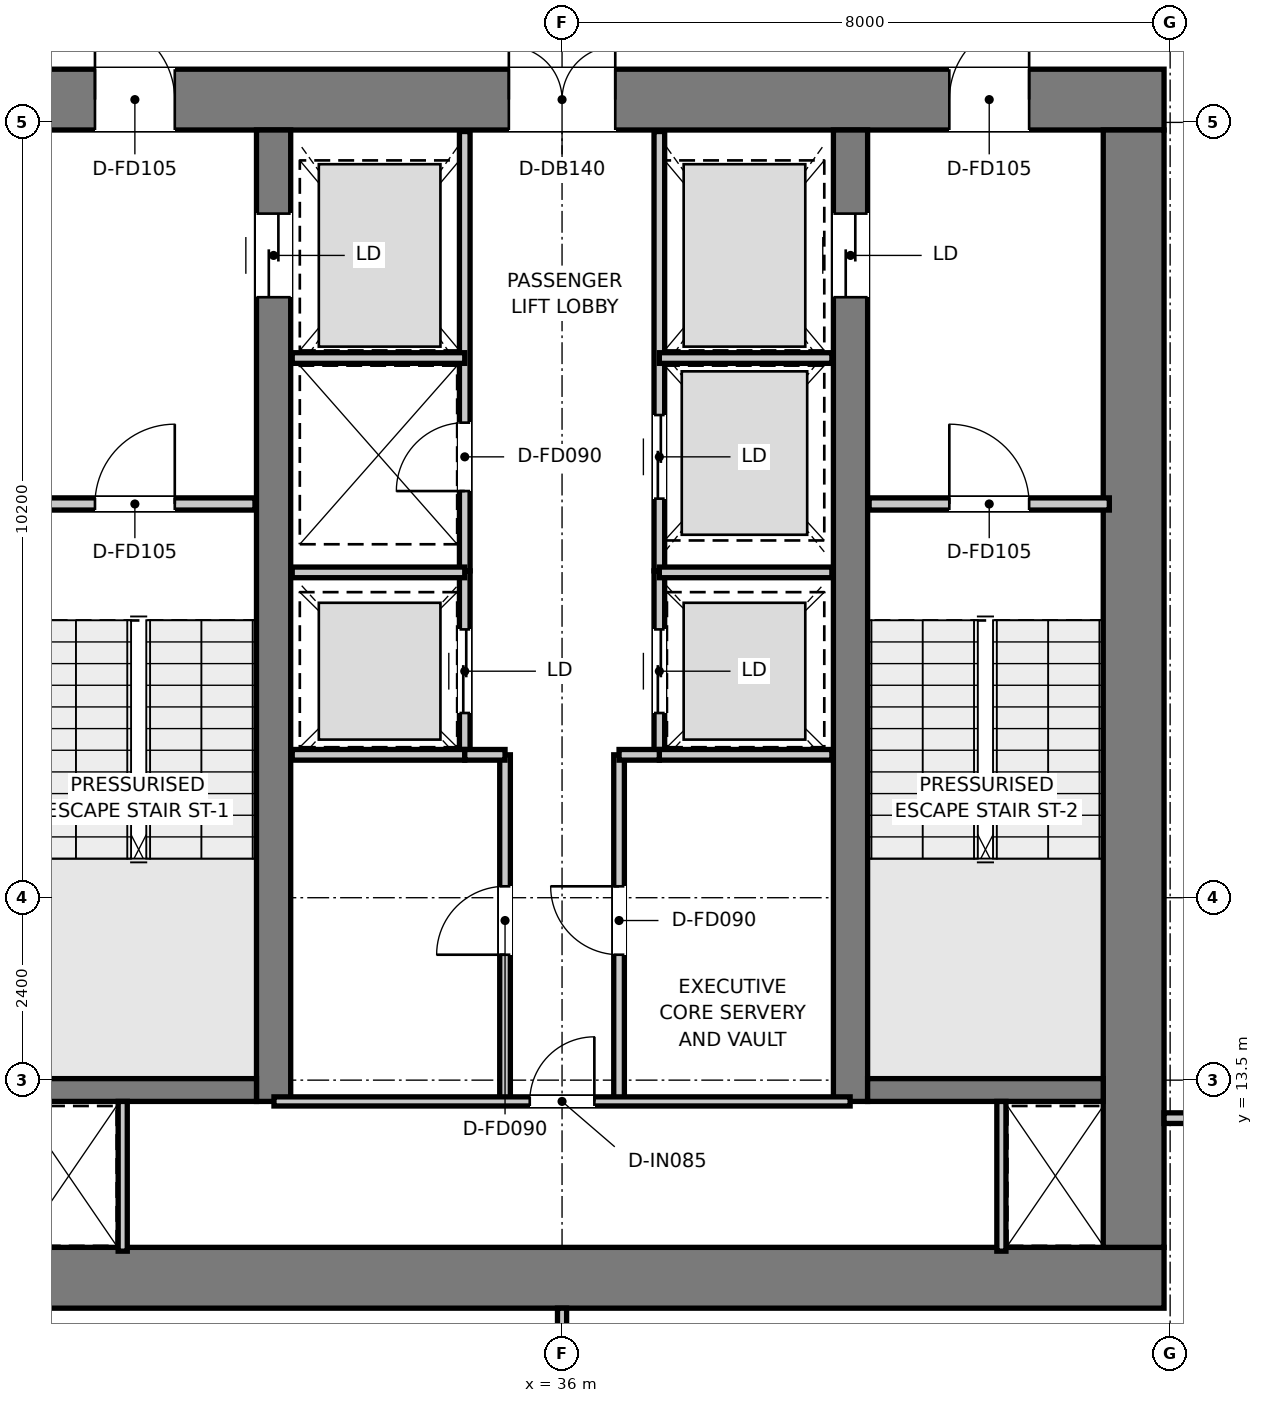
"""IFC4 building model, lengths in metres.
Left out: names, types, materials, properties, quantities, classifications, styles, units other than length and angle.
Written with IfcOpenShell. Run it as: python <this file> out.ifc"""

import sys

from ifc_helpers import new_model, si_unit, direction, frame, frame_2d, origin, place, context, subcontext, project, spatial, rectangle, extrude, element, fill, save


model = new_model("IFC4")
c1 = context("Model", 3, precision=1e-05, world=origin(), true_north=direction((0.0, 1.0)))
c2 = subcontext(c1, "Body", "Model", "MODEL_VIEW")
j1 = project(units=[si_unit("LENGTHUNIT", "METRE"), si_unit("PLANEANGLEUNIT", "RADIAN")], contexts=[c1])
p1 = place(None, origin())
s1 = spatial("IfcSite", under=j1, at=p1, CompositionType="ELEMENT")
p2 = place(p1, origin())
s2 = spatial("IfcBuilding", under=s1, at=p2, CompositionType="ELEMENT")
p3 = place(p2, frame((0.0, 0.0, 339.55)))
s3 = spatial("IfcBuildingStorey", under=s2, at=p3, CompositionType="ELEMENT", Elevation=339.55)
p4 = place(p3, frame((28.08, 10.9, 0.0), z_axis=(0.0, 0.0, 1.0), x_axis=(1.0, 0.0, 0.0)))
e1 = element("IfcWall", 1, at=p4, inside=s3, PredefinedType="SHEAR", context=c2, shape_type="SweptSolid", body=[
    extrude(rectangle(XDim=15.84, YDim=0.8, at=frame_2d((7.92, 0.0))), origin(), (0.0, 0.0, 1.0), 3.95),
])
p5 = place(p3, frame((28.08, 26.4, 0.0), z_axis=(0.0, 0.0, 1.0), x_axis=(1.0, 0.0, 0.0)))
e2 = element("IfcWall", 2, at=p5, inside=s3, PredefinedType="SHEAR", context=c2, shape_type="SweptSolid", body=[
    extrude(rectangle(XDim=15.84, YDim=0.8, at=frame_2d((7.92, 0.0))), origin(), (0.0, 0.0, 1.0), 3.95),
])
p6 = place(p5, frame((7.22, 0.0, 0.0)))
e3 = element("IfcOpeningElement", 3, at=p6, cuts=e2, PredefinedType="OPENING", context=c2, shape_type="SweptSolid", body=[
    extrude(rectangle(XDim=1.4, YDim=2.2, at=frame_2d((0.7, 1.1))), frame((0.0, 0.41, 0.0), z_axis=(0.0, -1.0, 0.0), x_axis=(1.0, 0.0, 0.0)), (0.0, 0.0, 1.0), 0.82),
])
p7 = place(p5, frame((1.775, 0.0, 0.0)))
e4 = element("IfcOpeningElement", 4, at=p7, cuts=e2, PredefinedType="OPENING", context=c2, shape_type="SweptSolid", body=[
    extrude(rectangle(XDim=1.05, YDim=2.1, at=frame_2d((0.525, 1.05))), frame((0.0, 0.41, 0.0), z_axis=(0.0, -1.0, 0.0), x_axis=(1.0, 0.0, 0.0)), (0.0, 0.0, 1.0), 0.82),
])
p8 = place(p5, frame((13.015, 0.0, 0.0)))
e5 = element("IfcOpeningElement", 5, at=p8, cuts=e2, PredefinedType="OPENING", context=c2, shape_type="SweptSolid", body=[
    extrude(rectangle(XDim=1.05, YDim=2.1, at=frame_2d((0.525, 1.05))), frame((0.0, 0.41, 0.0), z_axis=(0.0, -1.0, 0.0), x_axis=(1.0, 0.0, 0.0)), (0.0, 0.0, 1.0), 0.82),
])
p9 = place(p3, frame((43.52, 11.3, 0.0), z_axis=(0.0, 0.0, 1.0), x_axis=(0.0, 1.0, 0.0)))
e6 = element("IfcWall", 6, at=p9, inside=s3, PredefinedType="SHEAR", context=c2, shape_type="SweptSolid", body=[
    extrude(rectangle(XDim=14.7, YDim=0.8, at=frame_2d((7.35, 0.0))), origin(), (0.0, 0.0, 1.0), 3.95),
])
p10 = place(p3, frame((32.205, 13.22, 0.0), z_axis=(0.0, 0.0, 1.0), x_axis=(0.0, 1.0, 0.0)))
e7 = element("IfcWall", 7, at=p10, inside=s3, PredefinedType="SHEAR", context=c2, shape_type="SweptSolid", body=[
    extrude(rectangle(XDim=12.78, YDim=0.45, at=frame_2d((6.39, 0.0))), origin(), (0.0, 0.0, 1.0), 3.95),
])
p11 = place(p10, frame((10.58, 0.0, 0.0)))
e8 = element("IfcOpeningElement", 8, at=p11, cuts=e7, PredefinedType="OPENING", context=c2, shape_type="SweptSolid", body=[
    extrude(rectangle(XDim=1.1, YDim=2.15, at=frame_2d((0.55, 1.075))), frame((0.0, 0.235, 0.0), z_axis=(0.0, -1.0, 0.0), x_axis=(1.0, 0.0, 0.0)), (0.0, 0.0, 1.0), 0.47),
])
p12 = place(p3, frame((39.795, 13.22, 0.0), z_axis=(0.0, 0.0, 1.0), x_axis=(0.0, 1.0, 0.0)))
e9 = element("IfcWall", 9, at=p12, inside=s3, PredefinedType="SHEAR", context=c2, shape_type="SweptSolid", body=[
    extrude(rectangle(XDim=12.78, YDim=0.45, at=frame_2d((6.39, 0.0))), origin(), (0.0, 0.0, 1.0), 3.95),
])
p13 = place(p12, frame((10.58, 0.0, 0.0)))
e10 = element("IfcOpeningElement", 10, at=p13, cuts=e9, PredefinedType="OPENING", context=c2, shape_type="SweptSolid", body=[
    extrude(rectangle(XDim=1.1, YDim=2.15, at=frame_2d((0.55, 1.075))), frame((0.0, 0.235, 0.0), z_axis=(0.0, -1.0, 0.0), x_axis=(1.0, 0.0, 0.0)), (0.0, 0.0, 1.0), 0.47),
])
for number, where, z_axis, x_axis in (
    (11, (28.88, 13.37, 0.0), (0.0, 0.0, 1.0), (1.0, 0.0, 0.0)),
    (12, (40.02, 13.37, 0.0), (0.0, 0.0, 1.0), (1.0, 0.0, 0.0)),
):
    element("IfcWall", number, at=place(p3, frame(where, z_axis=z_axis, x_axis=x_axis)), inside=s3, PredefinedType="SHEAR", context=c2, shape_type="SweptSolid", body=[
        extrude(rectangle(XDim=3.1, YDim=0.3, at=frame_2d((1.55, 0.0))), origin(), (0.0, 0.0, 1.0), 3.95),
    ])
p14 = place(p3, frame((28.8, 21.08, 0.0), z_axis=(0.0, 0.0, 1.0), x_axis=(1.0, 0.0, 0.0)))
e13 = element("IfcWall", 13, at=p14, inside=s3, PredefinedType="PARTITIONING", context=c2, shape_type="SweptSolid", body=[
    extrude(rectangle(XDim=3.16, YDim=0.16, at=frame_2d((1.58, 0.0))), origin(), (0.0, 0.0, 1.0), 3.67),
])
p15 = place(p14, frame((1.055, 0.0, 0.0)))
e14 = element("IfcOpeningElement", 14, at=p15, cuts=e13, PredefinedType="OPENING", context=c2, shape_type="SweptSolid", body=[
    extrude(rectangle(XDim=1.05, YDim=2.1, at=frame_2d((0.525, 1.05))), frame((0.0, 0.09, 0.0), z_axis=(0.0, -1.0, 0.0), x_axis=(1.0, 0.0, 0.0)), (0.0, 0.0, 1.0), 0.18),
])
p16 = place(p3, frame((40.04, 21.08, 0.0), z_axis=(0.0, 0.0, 1.0), x_axis=(1.0, 0.0, 0.0)))
e15 = element("IfcWall", 15, at=p16, inside=s3, PredefinedType="PARTITIONING", context=c2, shape_type="SweptSolid", body=[
    extrude(rectangle(XDim=3.16, YDim=0.16, at=frame_2d((1.58, 0.0))), origin(), (0.0, 0.0, 1.0), 3.67),
])
p17 = place(p16, frame((1.055, 0.0, 0.0)))
e16 = element("IfcOpeningElement", 16, at=p17, cuts=e15, PredefinedType="OPENING", context=c2, shape_type="SweptSolid", body=[
    extrude(rectangle(XDim=1.05, YDim=2.1, at=frame_2d((0.525, 1.05))), frame((0.0, 0.09, 0.0), z_axis=(0.0, -1.0, 0.0), x_axis=(1.0, 0.0, 0.0)), (0.0, 0.0, 1.0), 0.18),
])
p18 = place(p3, frame((34.72, 20.2, 0.0), z_axis=(0.0, 0.0, 1.0), x_axis=(0.0, 1.0, 0.0)))
e17 = element("IfcWall", 17, at=p18, inside=s3, PredefinedType="PARTITIONING", context=c2, shape_type="SweptSolid", body=[
    extrude(rectangle(XDim=5.78, YDim=0.14, at=frame_2d((2.89, 0.0))), origin(), (0.0, 0.0, 1.0), 2.82),
])
p19 = place(p18, frame((1.05, 0.0, 0.0)))
e18 = element("IfcOpeningElement", 18, at=p19, cuts=e17, PredefinedType="OPENING", context=c2, shape_type="SweptSolid", body=[
    extrude(rectangle(XDim=0.9, YDim=2.1, at=frame_2d((0.45, 1.05))), frame((0.0, 0.08, 0.0), z_axis=(0.0, -1.0, 0.0), x_axis=(1.0, 0.0, 0.0)), (0.0, 0.0, 1.0), 0.16),
])
p20 = place(p3, frame((37.28, 20.2, 0.0), z_axis=(0.0, 0.0, 1.0), x_axis=(0.0, 1.0, 0.0)))
e19 = element("IfcWall", 19, at=p20, inside=s3, PredefinedType="PARTITIONING", context=c2, shape_type="SweptSolid", body=[
    extrude(rectangle(XDim=5.78, YDim=0.14, at=frame_2d((2.89, 0.0))), origin(), (0.0, 0.0, 1.0), 2.82),
])
p21 = place(p20, frame((0.95, 0.0, 0.0)))
e20 = element("IfcOpeningElement", 20, at=p21, cuts=e19, PredefinedType="OPENING", context=c2, shape_type="SweptSolid", body=[
    extrude(rectangle(XDim=1.1, YDim=2.15, at=frame_2d((0.55, 1.075))), frame((0.0, 0.08, 0.0), z_axis=(0.0, -1.0, 0.0), x_axis=(1.0, 0.0, 0.0)), (0.0, 0.0, 1.0), 0.16),
])
for number, where, z_axis, x_axis in (
    (21, (32.45, 23.0, 0.0), (0.0, 0.0, 1.0), (1.0, 0.0, 0.0)),
    (22, (37.28, 23.0, 0.0), (0.0, 0.0, 1.0), (1.0, 0.0, 0.0)),
):
    element("IfcWall", number, at=place(p3, frame(where, z_axis=z_axis, x_axis=x_axis)), inside=s3, PredefinedType="PARTITIONING", context=c2, shape_type="SweptSolid", body=[
        extrude(rectangle(XDim=2.27, YDim=0.14, at=frame_2d((1.135, 0.0))), origin(), (0.0, 0.0, 1.0), 2.82),
    ])
p22 = place(p3, frame((34.72, 17.78, 0.0), z_axis=(0.0, 0.0, 1.0), x_axis=(0.0, 1.0, 0.0)))
e23 = element("IfcWall", 23, at=p22, inside=s3, PredefinedType="PARTITIONING", context=c2, shape_type="SweptSolid", body=[
    extrude(rectangle(XDim=2.42, YDim=0.14, at=frame_2d((1.21, 0.0))), origin(), (0.0, 0.0, 1.0), 3.67),
])
p23 = place(p22, frame((0.55, 0.0, 0.0)))
e24 = element("IfcOpeningElement", 24, at=p23, cuts=e23, PredefinedType="OPENING", context=c2, shape_type="SweptSolid", body=[
    extrude(rectangle(XDim=1.1, YDim=2.15, at=frame_2d((0.55, 1.075))), frame((0.0, 0.08, 0.0), z_axis=(0.0, -1.0, 0.0), x_axis=(1.0, 0.0, 0.0)), (0.0, 0.0, 1.0), 0.16),
])
p24 = place(p3, frame((37.28, 17.78, 0.0), z_axis=(0.0, 0.0, 1.0), x_axis=(0.0, 1.0, 0.0)))
e25 = element("IfcWall", 25, at=p24, inside=s3, PredefinedType="PARTITIONING", context=c2, shape_type="SweptSolid", body=[
    extrude(rectangle(XDim=2.42, YDim=0.14, at=frame_2d((1.21, 0.0))), origin(), (0.0, 0.0, 1.0), 3.67),
])
p25 = place(p24, frame((0.55, 0.0, 0.0)))
e26 = element("IfcOpeningElement", 26, at=p25, cuts=e25, PredefinedType="OPENING", context=c2, shape_type="SweptSolid", body=[
    extrude(rectangle(XDim=1.1, YDim=2.15, at=frame_2d((0.55, 1.075))), frame((0.0, 0.08, 0.0), z_axis=(0.0, -1.0, 0.0), x_axis=(1.0, 0.0, 0.0)), (0.0, 0.0, 1.0), 0.16),
])
for number, where, z_axis, x_axis in (
    (27, (32.45, 17.78, 0.0), (0.0, 0.0, 1.0), (1.0, 0.0, 0.0)),
    (28, (32.45, 20.18, 0.0), (0.0, 0.0, 1.0), (1.0, 0.0, 0.0)),
    (29, (37.28, 17.78, 0.0), (0.0, 0.0, 1.0), (1.0, 0.0, 0.0)),
    (30, (37.28, 20.18, 0.0), (0.0, 0.0, 1.0), (1.0, 0.0, 0.0)),
):
    element("IfcWall", number, at=place(p3, frame(where, z_axis=z_axis, x_axis=x_axis)), inside=s3, PredefinedType="PARTITIONING", context=c2, shape_type="SweptSolid", body=[
        extrude(rectangle(XDim=2.27, YDim=0.14, at=frame_2d((1.135, 0.0))), origin(), (0.0, 0.0, 1.0), 3.67),
    ])
p26 = place(p3, frame((35.25, 13.22, 0.0), z_axis=(0.0, 0.0, 1.0), x_axis=(0.0, 1.0, 0.0)))
e31 = element("IfcWall", 31, at=p26, inside=s3, PredefinedType="PARTITIONING", context=c2, shape_type="SweptSolid", body=[
    extrude(rectangle(XDim=4.56, YDim=0.14, at=frame_2d((2.28, 0.0))), origin(), (0.0, 0.0, 1.0), 3.67),
])
p27 = place(p26, frame((1.93, 0.0, 0.0)))
e32 = element("IfcOpeningElement", 32, at=p27, cuts=e31, PredefinedType="OPENING", context=c2, shape_type="SweptSolid", body=[
    extrude(rectangle(XDim=0.9, YDim=2.1, at=frame_2d((0.45, 1.05))), frame((0.0, 0.08, 0.0), z_axis=(0.0, -1.0, 0.0), x_axis=(1.0, 0.0, 0.0)), (0.0, 0.0, 1.0), 0.16),
])
p28 = place(p3, frame((34.72, 17.78, 0.0), z_axis=(0.0, 0.0, 1.0), x_axis=(1.0, 0.0, 0.0)))
e33 = element("IfcWall", 33, at=p28, inside=s3, PredefinedType="PARTITIONING", context=c2, shape_type="SweptSolid", body=[
    extrude(rectangle(XDim=0.53, YDim=0.14, at=frame_2d((0.265, 0.0))), origin(), (0.0, 0.0, 1.0), 3.67),
])
p29 = place(p3, frame((36.75, 13.22, 0.0), z_axis=(0.0, 0.0, 1.0), x_axis=(0.0, 1.0, 0.0)))
e34 = element("IfcWall", 34, at=p29, inside=s3, PredefinedType="PARTITIONING", context=c2, shape_type="SweptSolid", body=[
    extrude(rectangle(XDim=4.56, YDim=0.14, at=frame_2d((2.28, 0.0))), origin(), (0.0, 0.0, 1.0), 3.67),
])
p30 = place(p29, frame((1.93, 0.0, 0.0)))
e35 = element("IfcOpeningElement", 35, at=p30, cuts=e34, PredefinedType="OPENING", context=c2, shape_type="SweptSolid", body=[
    extrude(rectangle(XDim=0.9, YDim=2.1, at=frame_2d((0.45, 1.05))), frame((0.0, 0.08, 0.0), z_axis=(0.0, -1.0, 0.0), x_axis=(1.0, 0.0, 0.0)), (0.0, 0.0, 1.0), 0.16),
])
p31 = place(p3, frame((36.75, 17.78, 0.0), z_axis=(0.0, 0.0, 1.0), x_axis=(1.0, 0.0, 0.0)))
e36 = element("IfcWall", 36, at=p31, inside=s3, PredefinedType="PARTITIONING", context=c2, shape_type="SweptSolid", body=[
    extrude(rectangle(XDim=0.53, YDim=0.14, at=frame_2d((0.265, 0.0))), origin(), (0.0, 0.0, 1.0), 3.67),
])
for number, where, z_axis, x_axis in (
    (37, (30.22, 11.25, 0.0), (0.0, 0.0, 1.0), (0.0, 1.0, 0.0)),
    (38, (41.78, 11.25, 0.0), (0.0, 0.0, 1.0), (0.0, 1.0, 0.0)),
):
    element("IfcWall", number, at=place(p3, frame(where, z_axis=z_axis, x_axis=x_axis)), inside=s3, PredefinedType="PARTITIONING", context=c2, shape_type="SweptSolid", body=[
        extrude(rectangle(XDim=1.97, YDim=0.12, at=frame_2d((0.985, 0.0))), origin(), (0.0, 0.0, 1.0), 3.67),
    ])
p32 = place(p3, frame((32.21, 13.22, 0.0), z_axis=(0.0, 0.0, 1.0), x_axis=(1.0, 0.0, 0.0)))
e39 = element("IfcWall", 39, at=p32, inside=s3, PredefinedType="PARTITIONING", context=c2, shape_type="SweptSolid", body=[
    extrude(rectangle(XDim=7.58, YDim=0.12, at=frame_2d((3.79, 0.0))), origin(), (0.0, 0.0, 1.0), 3.67),
])
p33 = place(p32, frame((3.365, 0.0, 0.0)))
e40 = element("IfcOpeningElement", 40, at=p33, cuts=e39, PredefinedType="OPENING", context=c2, shape_type="SweptSolid", body=[
    extrude(rectangle(XDim=0.85, YDim=2.1, at=frame_2d((0.425, 1.05))), frame((0.0, 0.07, 0.0), z_axis=(0.0, -1.0, 0.0), x_axis=(1.0, 0.0, 0.0)), (0.0, 0.0, 1.0), 0.14),
])
p34 = place(p3, frame((43.92, 13.0, 0.0), z_axis=(0.0, 0.0, 1.0), x_axis=(1.0, 0.0, 0.0)))
e41 = element("IfcWall", 41, at=p34, inside=s3, PredefinedType="PARTITIONING", context=c2, shape_type="SweptSolid", body=[
    extrude(rectangle(XDim=10.299, YDim=0.14, at=frame_2d((5.149, 0.0))), origin(), (0.0, 0.0, 1.0), 3.18),
])
p35 = place(p34, frame((0.455, 0.0, 0.0)))
e42 = element("IfcOpeningElement", 42, at=p35, cuts=e41, PredefinedType="OPENING", context=c2, shape_type="SweptSolid", body=[
    extrude(rectangle(XDim=0.85, YDim=2.1, at=frame_2d((0.425, 1.05))), frame((0.0, 0.08, 0.0), z_axis=(0.0, -1.0, 0.0), x_axis=(1.0, 0.0, 0.0)), (0.0, 0.0, 1.0), 0.16),
])
p36 = place(p3, frame((36.0, 6.845, 0.0), z_axis=(0.0, 0.0, 1.0), x_axis=(0.0, 1.0, 0.0)))
e43 = element("IfcWall", 43, at=p36, inside=s3, PredefinedType="PARTITIONING", context=c2, shape_type="SweptSolid", body=[
    extrude(rectangle(XDim=3.655, YDim=0.12, at=frame_2d((1.828, 0.0))), origin(), (0.0, 0.0, 1.0), 3.67),
])
p37 = place(p15, origin())
e44 = element("IfcDoor", 44, at=p37, inside=s3, OperationType="SINGLE_SWING_RIGHT", PredefinedType="DOOR", context=c2, shape_type="SweptSolid", body=[
    extrude(rectangle(XDim=1.05, YDim=2.1, at=frame_2d((0.525, 1.05))), frame((0.0, 0.025, 0.0), z_axis=(0.0, -1.0, 0.0), x_axis=(1.0, 0.0, 0.0)), (0.0, 0.0, 1.0), 0.05),
])
fill(e14, e44)
p38 = place(p17, origin())
e45 = element("IfcDoor", 45, at=p38, inside=s3, OperationType="SINGLE_SWING_LEFT", PredefinedType="DOOR", context=c2, shape_type="SweptSolid", body=[
    extrude(rectangle(XDim=1.05, YDim=2.1, at=frame_2d((0.525, 1.05))), frame((0.0, 0.025, 0.0), z_axis=(0.0, -1.0, 0.0), x_axis=(1.0, 0.0, 0.0)), (0.0, 0.0, 1.0), 0.05),
])
fill(e16, e45)
p39 = place(p6, origin())
e46 = element("IfcDoor", 46, at=p39, inside=s3, OperationType="DOUBLE_DOOR_SINGLE_SWING", PredefinedType="DOOR", context=c2, shape_type="SweptSolid", body=[
    extrude(rectangle(XDim=1.4, YDim=2.2, at=frame_2d((0.7, 1.1))), frame((0.0, 0.025, 0.0), z_axis=(0.0, -1.0, 0.0), x_axis=(1.0, 0.0, 0.0)), (0.0, 0.0, 1.0), 0.05),
])
fill(e3, e46)
p40 = place(p7, origin())
e47 = element("IfcDoor", 47, at=p40, inside=s3, OperationType="SINGLE_SWING_LEFT", PredefinedType="DOOR", context=c2, shape_type="SweptSolid", body=[
    extrude(rectangle(XDim=1.05, YDim=2.1, at=frame_2d((0.525, 1.05))), frame((0.0, 0.025, 0.0), z_axis=(0.0, -1.0, 0.0), x_axis=(1.0, 0.0, 0.0)), (0.0, 0.0, 1.0), 0.05),
])
fill(e4, e47)
p41 = place(p8, origin())
e48 = element("IfcDoor", 48, at=p41, inside=s3, OperationType="SINGLE_SWING_RIGHT", PredefinedType="DOOR", context=c2, shape_type="SweptSolid", body=[
    extrude(rectangle(XDim=1.05, YDim=2.1, at=frame_2d((0.525, 1.05))), frame((0.0, 0.025, 0.0), z_axis=(0.0, -1.0, 0.0), x_axis=(1.0, 0.0, 0.0)), (0.0, 0.0, 1.0), 0.05),
])
fill(e5, e48)
p42 = place(p11, origin())
e49 = element("IfcDoor", 49, at=p42, inside=s3, OperationType="DOUBLE_DOOR_SLIDING", PredefinedType="DOOR", context=c2, shape_type="SweptSolid", body=[
    extrude(rectangle(XDim=1.1, YDim=2.15, at=frame_2d((0.55, 1.075))), frame((0.0, 0.025, 0.0), z_axis=(0.0, -1.0, 0.0), x_axis=(1.0, 0.0, 0.0)), (0.0, 0.0, 1.0), 0.05),
])
fill(e8, e49)
p43 = place(p13, origin())
e50 = element("IfcDoor", 50, at=p43, inside=s3, OperationType="DOUBLE_DOOR_SLIDING", PredefinedType="DOOR", context=c2, shape_type="SweptSolid", body=[
    extrude(rectangle(XDim=1.1, YDim=2.15, at=frame_2d((0.55, 1.075))), frame((0.0, 0.025, 0.0), z_axis=(0.0, -1.0, 0.0), x_axis=(1.0, 0.0, 0.0)), (0.0, 0.0, 1.0), 0.05),
])
fill(e10, e50)
p44 = place(p19, origin())
e51 = element("IfcDoor", 51, at=p44, inside=s3, OperationType="SINGLE_SWING_LEFT", PredefinedType="DOOR", context=c2, shape_type="SweptSolid", body=[
    extrude(rectangle(XDim=0.9, YDim=2.1, at=frame_2d((0.45, 1.05))), frame((0.0, 0.025, 0.0), z_axis=(0.0, -1.0, 0.0), x_axis=(1.0, 0.0, 0.0)), (0.0, 0.0, 1.0), 0.05),
])
fill(e18, e51)
p45 = place(p21, origin())
e52 = element("IfcDoor", 52, at=p45, inside=s3, OperationType="DOUBLE_DOOR_SLIDING", PredefinedType="DOOR", context=c2, shape_type="SweptSolid", body=[
    extrude(rectangle(XDim=1.1, YDim=2.15, at=frame_2d((0.55, 1.075))), frame((0.0, 0.025, 0.0), z_axis=(0.0, -1.0, 0.0), x_axis=(1.0, 0.0, 0.0)), (0.0, 0.0, 1.0), 0.05),
])
fill(e20, e52)
p46 = place(p23, origin())
e53 = element("IfcDoor", 53, at=p46, inside=s3, OperationType="DOUBLE_DOOR_SLIDING", PredefinedType="DOOR", context=c2, shape_type="SweptSolid", body=[
    extrude(rectangle(XDim=1.1, YDim=2.15, at=frame_2d((0.55, 1.075))), frame((0.0, 0.025, 0.0), z_axis=(0.0, -1.0, 0.0), x_axis=(1.0, 0.0, 0.0)), (0.0, 0.0, 1.0), 0.05),
])
fill(e24, e53)
p47 = place(p25, origin())
e54 = element("IfcDoor", 54, at=p47, inside=s3, OperationType="DOUBLE_DOOR_SLIDING", PredefinedType="DOOR", context=c2, shape_type="SweptSolid", body=[
    extrude(rectangle(XDim=1.1, YDim=2.15, at=frame_2d((0.55, 1.075))), frame((0.0, 0.025, 0.0), z_axis=(0.0, -1.0, 0.0), x_axis=(1.0, 0.0, 0.0)), (0.0, 0.0, 1.0), 0.05),
])
fill(e26, e54)
p48 = place(p27, origin())
e55 = element("IfcDoor", 55, at=p48, inside=s3, OperationType="SINGLE_SWING_LEFT", PredefinedType="DOOR", context=c2, shape_type="SweptSolid", body=[
    extrude(rectangle(XDim=0.9, YDim=2.1, at=frame_2d((0.45, 1.05))), frame((0.0, 0.025, 0.0), z_axis=(0.0, -1.0, 0.0), x_axis=(1.0, 0.0, 0.0)), (0.0, 0.0, 1.0), 0.05),
])
fill(e32, e55)
p49 = place(p30, origin())
e56 = element("IfcDoor", 56, at=p49, inside=s3, OperationType="SINGLE_SWING_RIGHT", PredefinedType="DOOR", context=c2, shape_type="SweptSolid", body=[
    extrude(rectangle(XDim=0.9, YDim=2.1, at=frame_2d((0.45, 1.05))), frame((0.0, 0.025, 0.0), z_axis=(0.0, -1.0, 0.0), x_axis=(1.0, 0.0, 0.0)), (0.0, 0.0, 1.0), 0.05),
])
fill(e35, e56)
p50 = place(p33, origin())
e57 = element("IfcDoor", 57, at=p50, inside=s3, OperationType="SINGLE_SWING_RIGHT", PredefinedType="DOOR", context=c2, shape_type="SweptSolid", body=[
    extrude(rectangle(XDim=0.85, YDim=2.1, at=frame_2d((0.425, 1.05))), frame((0.0, 0.025, 0.0), z_axis=(0.0, -1.0, 0.0), x_axis=(1.0, 0.0, 0.0)), (0.0, 0.0, 1.0), 0.05),
])
fill(e40, e57)
save(model, sys.argv[1])
